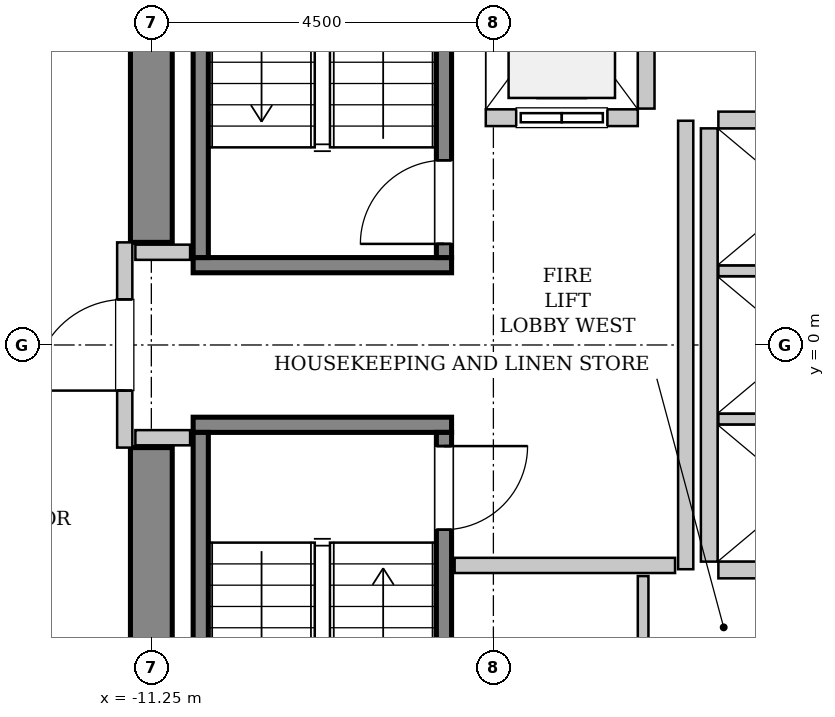
"""IFC4 building model, lengths in metres.
Left out: names, types, materials, properties, quantities, classifications, styles, units other than length and angle.
Written with IfcOpenShell. Run it as: python <this file> out.ifc"""

import sys

from ifc_helpers import new_model, si_unit, direction, frame, frame_2d, origin, place, context, subcontext, project, spatial, rectangle, extrude, source, transform, mapped, element, fill, save


model = new_model("IFC4")
c1 = context("Model", 3, precision=1e-05, world=origin(), true_north=direction((0.0, 1.0)))
c2 = subcontext(c1, "Body", "Model", "MODEL_VIEW")
j1 = project(units=[si_unit("LENGTHUNIT", "METRE"), si_unit("PLANEANGLEUNIT", "RADIAN")], contexts=[c1])
p1 = place(None, origin())
s1 = spatial("IfcSite", under=j1, at=p1, CompositionType="ELEMENT")
p2 = place(p1, origin())
s2 = spatial("IfcBuilding", under=s1, at=p2, CompositionType="ELEMENT")
p3 = place(p2, frame((0.0, 0.0, 121.2)))
s3 = spatial("IfcBuildingStorey", under=s2, at=p3, CompositionType="ELEMENT", Elevation=121.2)
m1 = source(origin(), c2, "Body", "SweptSolid", [
    extrude(rectangle(XDim=7.375, YDim=0.55, at=frame_2d((3.688, 0.0))), origin(), (0.0, 0.0, 1.0), 3.8),
])
for number, where, z_axis, x_axis in (
    (1, (-11.25, -8.725, 0.0), (0.0, 0.0, 1.0), (0.0, 1.0, 0.0)),
    (2, (-11.25, 1.35, 0.0), (0.0, 0.0, 1.0), (0.0, 1.0, 0.0)),
):
    element("IfcWall", number, at=place(p3, frame(where, z_axis=z_axis, x_axis=x_axis)), inside=s3, PredefinedType="SHEAR", context=c2, shape_type="MappedRepresentation", body=[
        mapped(m1, transform((0.0, 0.0, 0.0), x_axis=(1.0, 0.0, 0.0), y_axis=(0.0, 1.0, 0.0), z_axis=(0.0, 0.0, 1.0), scale=1.0)),
    ])
m2 = source(origin(), c2, "Body", "SweptSolid", [
    extrude(rectangle(XDim=3.4, YDim=0.2, at=frame_2d((1.7, 0.0))), origin(), (0.0, 0.0, 1.0), 3.8),
])
p4 = place(p3, frame((-7.3, 1.05, 0.0), z_axis=(0.0, 0.0, 1.0), x_axis=(-1.0, 0.0, 0.0)))
e3 = element("IfcWall", 3, at=p4, inside=s3, PredefinedType="SOLIDWALL", context=c2, shape_type="MappedRepresentation", body=[
    mapped(m2, transform((0.0, 0.0, 0.0), x_axis=(1.0, 0.0, 0.0), y_axis=(0.0, 1.0, 0.0), z_axis=(0.0, 0.0, 1.0), scale=1.0)),
])
m3 = source(origin(), c2, "Body", "SweptSolid", [
    extrude(rectangle(XDim=7.1, YDim=0.2, at=frame_2d((3.55, 0.0))), origin(), (0.0, 0.0, 1.0), 3.8),
])
p5 = place(p3, frame((-7.4, 1.15, 0.0), z_axis=(0.0, 0.0, 1.0), x_axis=(0.0, 1.0, 0.0)))
e4 = element("IfcWall", 4, at=p5, inside=s3, PredefinedType="SOLIDWALL", context=c2, shape_type="MappedRepresentation", body=[
    mapped(m3, transform((0.0, 0.0, 0.0), x_axis=(1.0, 0.0, 0.0), y_axis=(0.0, 1.0, 0.0), z_axis=(0.0, 0.0, 1.0), scale=1.0)),
])
p6 = place(p5, frame((0.18, 0.0, 0.0)))
e5 = element("IfcOpeningElement", 5, at=p6, cuts=e4, PredefinedType="OPENING", context=c2, shape_type="SweptSolid", body=[
    extrude(rectangle(XDim=1.1, YDim=2.15, at=frame_2d((0.55, 1.075))), frame((0.0, 0.11, 0.0), z_axis=(0.0, -1.0, 0.0), x_axis=(1.0, 0.0, 0.0)), (0.0, 0.0, 1.0), 0.22),
])
p7 = place(p3, frame((-10.6, 1.15, 0.0), z_axis=(0.0, 0.0, 1.0), x_axis=(0.0, 1.0, 0.0)))
e6 = element("IfcWall", 6, at=p7, inside=s3, PredefinedType="SOLIDWALL", context=c2, shape_type="MappedRepresentation", body=[
    mapped(m3, transform((0.0, 0.0, 0.0), x_axis=(1.0, 0.0, 0.0), y_axis=(0.0, 1.0, 0.0), z_axis=(0.0, 0.0, 1.0), scale=1.0)),
])
p8 = place(p3, frame((-10.7, -1.05, 0.0), z_axis=(0.0, 0.0, 1.0), x_axis=(1.0, 0.0, 0.0)))
e7 = element("IfcWall", 7, at=p8, inside=s3, PredefinedType="SOLIDWALL", context=c2, shape_type="MappedRepresentation", body=[
    mapped(m2, transform((0.0, 0.0, 0.0), x_axis=(1.0, 0.0, 0.0), y_axis=(0.0, 1.0, 0.0), z_axis=(0.0, 0.0, 1.0), scale=1.0)),
])
p9 = place(p3, frame((-10.6, -1.15, 0.0), z_axis=(0.0, 0.0, 1.0), x_axis=(0.0, -1.0, 0.0)))
e8 = element("IfcWall", 8, at=p9, inside=s3, PredefinedType="SOLIDWALL", context=c2, shape_type="MappedRepresentation", body=[
    mapped(m3, transform((0.0, 0.0, 0.0), x_axis=(1.0, 0.0, 0.0), y_axis=(0.0, 1.0, 0.0), z_axis=(0.0, 0.0, 1.0), scale=1.0)),
])
p10 = place(p3, frame((-7.4, -1.15, 0.0), z_axis=(0.0, 0.0, 1.0), x_axis=(0.0, -1.0, 0.0)))
e9 = element("IfcWall", 9, at=p10, inside=s3, PredefinedType="SOLIDWALL", context=c2, shape_type="MappedRepresentation", body=[
    mapped(m3, transform((0.0, 0.0, 0.0), x_axis=(1.0, 0.0, 0.0), y_axis=(0.0, 1.0, 0.0), z_axis=(0.0, 0.0, 1.0), scale=1.0)),
])
p11 = place(p10, frame((0.18, 0.0, 0.0)))
e10 = element("IfcOpeningElement", 10, at=p11, cuts=e9, PredefinedType="OPENING", context=c2, shape_type="SweptSolid", body=[
    extrude(rectangle(XDim=1.1, YDim=2.15, at=frame_2d((0.55, 1.075))), frame((0.0, 0.11, 0.0), z_axis=(0.0, -1.0, 0.0), x_axis=(1.0, 0.0, 0.0)), (0.0, 0.0, 1.0), 0.22),
])
m4 = source(origin(), c2, "Body", "SweptSolid", [
    extrude(rectangle(XDim=2.0, YDim=0.22, at=frame_2d((1.0, 0.0))), origin(), (0.0, 0.0, 1.0), 3.535),
])
p12 = place(p3, frame((-6.85, 2.99, 0.0), z_axis=(0.0, 0.0, 1.0), x_axis=(1.0, 0.0, 0.0)))
e11 = element("IfcWall", 11, at=p12, inside=s3, PredefinedType="SOLIDWALL", context=c2, shape_type="MappedRepresentation", body=[
    mapped(m4, transform((0.0, 0.0, 0.0), x_axis=(1.0, 0.0, 0.0), y_axis=(0.0, 1.0, 0.0), z_axis=(0.0, 0.0, 1.0), scale=1.0)),
])
p13 = place(p12, frame((0.4, 0.0, 0.0)))
e12 = element("IfcOpeningElement", 12, at=p13, cuts=e11, PredefinedType="OPENING", context=c2, shape_type="SweptSolid", body=[
    extrude(rectangle(XDim=1.2, YDim=2.2, at=frame_2d((0.6, 1.1))), frame((0.0, 0.12, 0.0), z_axis=(0.0, -1.0, 0.0), x_axis=(1.0, 0.0, 0.0)), (0.0, 0.0, 1.0), 0.24),
])
m5 = source(origin(), c2, "Body", "SweptSolid", [
    extrude(rectangle(XDim=2.68, YDim=0.22, at=frame_2d((1.34, 0.0))), origin(), (0.0, 0.0, 1.0), 3.535),
])
p14 = place(p3, frame((-4.74, 3.11, 0.0), z_axis=(0.0, 0.0, 1.0), x_axis=(0.0, 1.0, 0.0)))
e13 = element("IfcWall", 13, at=p14, inside=s3, PredefinedType="SOLIDWALL", context=c2, shape_type="MappedRepresentation", body=[
    mapped(m5, transform((0.0, 0.0, 0.0), x_axis=(1.0, 0.0, 0.0), y_axis=(0.0, 1.0, 0.0), z_axis=(0.0, 0.0, 1.0), scale=1.0)),
])
m6 = source(origin(), c2, "Body", "SweptSolid", [
    extrude(rectangle(XDim=5.7, YDim=0.22, at=frame_2d((2.85, 0.0))), origin(), (0.0, 0.0, 1.0), 3.535),
])
p15 = place(p3, frame((-3.91, 2.85, 0.0), z_axis=(0.0, 0.0, 1.0), x_axis=(0.0, -1.0, 0.0)))
e14 = element("IfcWall", 14, at=p15, inside=s3, PredefinedType="SOLIDWALL", context=c2, shape_type="MappedRepresentation", body=[
    mapped(m6, transform((0.0, 0.0, 0.0), x_axis=(1.0, 0.0, 0.0), y_axis=(0.0, 1.0, 0.0), z_axis=(0.0, 0.0, 1.0), scale=1.0)),
])
m7 = source(origin(), c2, "Body", "SweptSolid", [
    extrude(rectangle(XDim=2.13, YDim=0.22, at=frame_2d((1.065, 0.0))), origin(), (0.0, 0.0, 1.0), 3.535),
])
p16 = place(p3, frame((-3.79, -2.96, 0.0), z_axis=(0.0, 0.0, 1.0), x_axis=(1.0, 0.0, 0.0)))
e15 = element("IfcWall", 15, at=p16, inside=s3, PredefinedType="SOLIDWALL", context=c2, shape_type="MappedRepresentation", body=[
    mapped(m7, transform((0.0, 0.0, 0.0), x_axis=(1.0, 0.0, 0.0), y_axis=(0.0, 1.0, 0.0), z_axis=(0.0, 0.0, 1.0), scale=1.0)),
])
m8 = source(origin(), c2, "Body", "SweptSolid", [
    extrude(rectangle(XDim=2.13, YDim=0.14, at=frame_2d((1.065, 0.0))), origin(), (0.0, 0.0, 1.0), 3.535),
])
for number, where, z_axis, x_axis in (
    (16, (-3.79, -0.975, 0.0), (0.0, 0.0, 1.0), (1.0, 0.0, 0.0)),
    (17, (-3.79, 0.975, 0.0), (0.0, 0.0, 1.0), (1.0, 0.0, 0.0)),
):
    element("IfcWall", number, at=place(p3, frame(where, z_axis=z_axis, x_axis=x_axis)), inside=s3, PredefinedType="PARTITIONING", context=c2, shape_type="MappedRepresentation", body=[
        mapped(m8, transform((0.0, 0.0, 0.0), x_axis=(1.0, 0.0, 0.0), y_axis=(0.0, 1.0, 0.0), z_axis=(0.0, 0.0, 1.0), scale=1.0)),
    ])
p17 = place(p3, frame((-1.66, 2.96, 0.0), z_axis=(0.0, 0.0, 1.0), x_axis=(-1.0, 0.0, 0.0)))
e18 = element("IfcWall", 18, at=p17, inside=s3, PredefinedType="SOLIDWALL", context=c2, shape_type="MappedRepresentation", body=[
    mapped(m7, transform((0.0, 0.0, 0.0), x_axis=(1.0, 0.0, 0.0), y_axis=(0.0, 1.0, 0.0), z_axis=(0.0, 0.0, 1.0), scale=1.0)),
])
m9 = source(origin(), c2, "Body", "SweptSolid", [
    extrude(rectangle(XDim=2.7, YDim=0.2, at=frame_2d((1.35, 0.0))), origin(), (0.0, 0.0, 1.0), 2.425),
])
p18 = place(p3, frame((-11.6, -1.35, 0.0), z_axis=(0.0, 0.0, 1.0), x_axis=(0.0, 1.0, 0.0)))
e19 = element("IfcWall", 19, at=p18, inside=s3, PredefinedType="PARTITIONING", context=c2, shape_type="MappedRepresentation", body=[
    mapped(m9, transform((0.0, 0.0, 0.0), x_axis=(1.0, 0.0, 0.0), y_axis=(0.0, 1.0, 0.0), z_axis=(0.0, 0.0, 1.0), scale=1.0)),
])
p19 = place(p18, frame((0.75, 0.0, 0.0)))
e20 = element("IfcOpeningElement", 20, at=p19, cuts=e19, PredefinedType="OPENING", context=c2, shape_type="SweptSolid", body=[
    extrude(rectangle(XDim=1.2, YDim=2.15, at=frame_2d((0.6, 1.075))), frame((0.0, 0.11, 0.0), z_axis=(0.0, -1.0, 0.0), x_axis=(1.0, 0.0, 0.0)), (0.0, 0.0, 1.0), 0.22),
])
m10 = source(origin(), c2, "Body", "SweptSolid", [
    extrude(rectangle(XDim=5.9, YDim=0.2, at=frame_2d((2.95, 0.0))), origin(), (0.0, 0.0, 1.0), 3.535),
])
p20 = place(p3, frame((-4.22, -2.95, 0.0), z_axis=(0.0, 0.0, 1.0), x_axis=(0.0, 1.0, 0.0)))
e21 = element("IfcWall", 21, at=p20, inside=s3, PredefinedType="PARTITIONING", context=c2, shape_type="MappedRepresentation", body=[
    mapped(m10, transform((0.0, 0.0, 0.0), x_axis=(1.0, 0.0, 0.0), y_axis=(0.0, 1.0, 0.0), z_axis=(0.0, 0.0, 1.0), scale=1.0)),
])
m11 = source(origin(), c2, "Body", "SweptSolid", [
    extrude(rectangle(XDim=2.9, YDim=0.2, at=frame_2d((1.45, 0.0))), origin(), (0.0, 0.0, 1.0), 3.535),
])
p21 = place(p3, frame((-7.26, -2.9, 0.0), z_axis=(0.0, 0.0, 1.0), x_axis=(1.0, 0.0, 0.0)))
e22 = element("IfcWall", 22, at=p21, inside=s3, PredefinedType="PARTITIONING", context=c2, shape_type="MappedRepresentation", body=[
    mapped(m11, transform((0.0, 0.0, 0.0), x_axis=(1.0, 0.0, 0.0), y_axis=(0.0, 1.0, 0.0), z_axis=(0.0, 0.0, 1.0), scale=1.0)),
])
m12 = source(origin(), c2, "Body", "SweptSolid", [
    extrude(rectangle(XDim=0.72, YDim=0.2, at=frame_2d((0.36, 0.0))), origin(), (0.0, 0.0, 1.0), 3.535),
])
for number, where, z_axis, x_axis in (
    (23, (-11.46, 1.22, 0.0), (0.0, 0.0, 1.0), (1.0, 0.0, 0.0)),
    (24, (-11.46, -1.22, 0.0), (0.0, 0.0, 1.0), (1.0, 0.0, 0.0)),
):
    element("IfcWall", number, at=place(p3, frame(where, z_axis=z_axis, x_axis=x_axis)), inside=s3, PredefinedType="PARTITIONING", context=c2, shape_type="MappedRepresentation", body=[
        mapped(m12, transform((0.0, 0.0, 0.0), x_axis=(1.0, 0.0, 0.0), y_axis=(0.0, 1.0, 0.0), z_axis=(0.0, 0.0, 1.0), scale=1.0)),
    ])
m13 = source(origin(), c2, "Body", "SweptSolid", [
    extrude(rectangle(XDim=1.26, YDim=0.14, at=frame_2d((0.63, 0.0))), origin(), (0.0, 0.0, 1.0), 3.535),
])
p22 = place(p3, frame((-4.78, -4.3, 0.0), z_axis=(0.0, 0.0, 1.0), x_axis=(0.0, 1.0, 0.0)))
e25 = element("IfcWall", 25, at=p22, inside=s3, PredefinedType="PARTITIONING", context=c2, shape_type="MappedRepresentation", body=[
    mapped(m13, transform((0.0, 0.0, 0.0), x_axis=(1.0, 0.0, 0.0), y_axis=(0.0, 1.0, 0.0), z_axis=(0.0, 0.0, 1.0), scale=1.0)),
])
m14 = source(origin(), c2, "Body", "SweptSolid", [
    extrude(rectangle(XDim=1.1, YDim=2.15, at=frame_2d((0.55, 1.075))), frame((0.0, 0.025, 0.0), z_axis=(0.0, -1.0, 0.0), x_axis=(1.0, 0.0, 0.0)), (0.0, 0.0, 1.0), 0.05),
])
p23 = place(p6, origin())
e26 = element("IfcDoor", 26, at=p23, inside=s3, OperationType="SINGLE_SWING_LEFT", PredefinedType="DOOR", context=c2, shape_type="MappedRepresentation", body=[
    mapped(m14, transform((0.0, 0.0, 0.0), x_axis=(1.0, 0.0, 0.0), y_axis=(0.0, 1.0, 0.0), z_axis=(0.0, 0.0, 1.0), scale=1.0)),
])
fill(e5, e26)
p24 = place(p11, origin())
e27 = element("IfcDoor", 27, at=p24, inside=s3, OperationType="SINGLE_SWING_LEFT", PredefinedType="DOOR", context=c2, shape_type="MappedRepresentation", body=[
    mapped(m14, transform((0.0, 0.0, 0.0), x_axis=(1.0, 0.0, 0.0), y_axis=(0.0, 1.0, 0.0), z_axis=(0.0, 0.0, 1.0), scale=1.0)),
])
fill(e10, e27)
m15 = source(origin(), c2, "Body", "SweptSolid", [
    extrude(rectangle(XDim=1.2, YDim=2.2, at=frame_2d((0.6, 1.1))), frame((0.0, 0.025, 0.0), z_axis=(0.0, -1.0, 0.0), x_axis=(1.0, 0.0, 0.0)), (0.0, 0.0, 1.0), 0.05),
])
p25 = place(p13, origin())
e28 = element("IfcDoor", 28, at=p25, inside=s3, OperationType="SLIDING_TO_LEFT", PredefinedType="DOOR", context=c2, shape_type="MappedRepresentation", body=[
    mapped(m15, transform((0.0, 0.0, 0.0), x_axis=(1.0, 0.0, 0.0), y_axis=(0.0, 1.0, 0.0), z_axis=(0.0, 0.0, 1.0), scale=1.0)),
])
fill(e12, e28)
m16 = source(origin(), c2, "Body", "SweptSolid", [
    extrude(rectangle(XDim=1.2, YDim=2.15, at=frame_2d((0.6, 1.075))), frame((0.0, 0.025, 0.0), z_axis=(0.0, -1.0, 0.0), x_axis=(1.0, 0.0, 0.0)), (0.0, 0.0, 1.0), 0.05),
])
p26 = place(p19, origin())
e29 = element("IfcDoor", 29, at=p26, inside=s3, OperationType="SINGLE_SWING_LEFT", PredefinedType="DOOR", context=c2, shape_type="MappedRepresentation", body=[
    mapped(m16, transform((0.0, 0.0, 0.0), x_axis=(1.0, 0.0, 0.0), y_axis=(0.0, 1.0, 0.0), z_axis=(0.0, 0.0, 1.0), scale=1.0)),
])
fill(e20, e29)
save(model, sys.argv[1])
